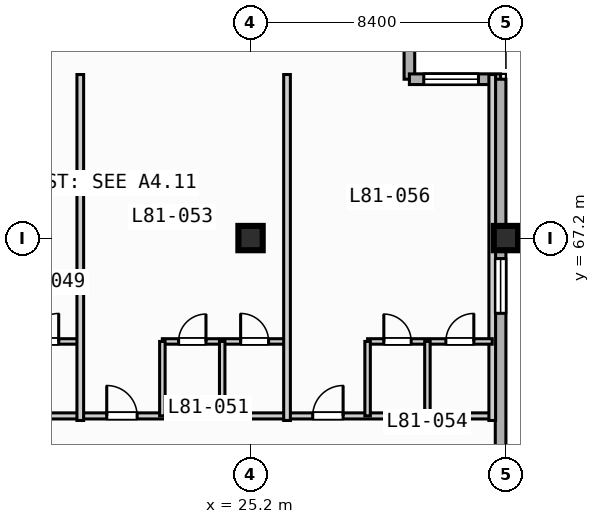
"""IFC4 building model, lengths in metres.
Left out: names, types, materials, properties, quantities, classifications, styles, units other than length and angle.
Written with IfcOpenShell. Run it as: python <this file> out.ifc"""

import sys

from ifc_helpers import new_model, si_unit, direction, frame, frame_2d, origin, origin_2d, place, context, subcontext, project, spatial, rectangle, extrude, element, fill, save


model = new_model("IFC4")
c1 = context("Model", 3, precision=1e-05, world=origin(), true_north=direction((0.0, 1.0)))
c2 = subcontext(c1, "Body", "Model", "MODEL_VIEW")
j1 = project(units=[si_unit("LENGTHUNIT", "METRE"), si_unit("PLANEANGLEUNIT", "RADIAN")], contexts=[c1])
p1 = place(None, origin())
s1 = spatial("IfcSite", under=j1, at=p1, CompositionType="ELEMENT")
p2 = place(p1, origin())
s2 = spatial("IfcBuilding", under=s1, at=p2, CompositionType="ELEMENT")
p3 = place(p2, frame((0.0, 0.0, 328.1)))
s3 = spatial("IfcBuildingStorey", under=s2, at=p3, CompositionType="ELEMENT", Elevation=328.1)
for number, where, z_axis, x_axis in (
    (1, (25.2, 67.2, 0.0), (0.0, 0.0, 1.0), (1.0, 0.0, 0.0)),
    (2, (33.6, 67.2, 0.0), (0.0, 0.0, 1.0), (1.0, 0.0, 0.0)),
):
    element("IfcColumn", number, at=place(p3, frame(where, z_axis=z_axis, x_axis=x_axis)), inside=s3, PredefinedType="COLUMN", context=c2, shape_type="SweptSolid", body=[
        extrude(rectangle(XDim=0.8, YDim=0.8, at=origin_2d()), origin(), (0.0, 0.0, 1.0), 3.9),
    ])
p4 = place(p3, frame((30.425, 75.425, 0.0), z_axis=(0.0, 0.0, 1.0), x_axis=(0.0, -1.0, 0.0)))
e3 = element("IfcWall", 3, at=p4, inside=s3, PredefinedType="STANDARD", context=c2, shape_type="SweptSolid", body=[
    extrude(rectangle(XDim=3.0, YDim=0.35, at=frame_2d((1.5, 0.0))), origin(), (0.0, 0.0, 1.0), 3.67),
])
p5 = place(p3, frame((30.425, 72.425, 0.0), z_axis=(0.0, 0.0, 1.0), x_axis=(1.0, 0.0, 0.0)))
e4 = element("IfcWall", 4, at=p5, inside=s3, PredefinedType="STANDARD", context=c2, shape_type="SweptSolid", body=[
    extrude(rectangle(XDim=3.0, YDim=0.35, at=frame_2d((1.5, 0.0))), origin(), (0.0, 0.0, 1.0), 3.67),
])
p6 = place(p5, frame((0.472, 0.0, 0.85)))
e5 = element("IfcOpeningElement", 5, at=p6, cuts=e4, PredefinedType="OPENING", context=c2, shape_type="SweptSolid", body=[
    extrude(rectangle(XDim=1.8, YDim=1.8, at=frame_2d((0.9, 0.9))), frame((0.0, 0.185, 0.0), z_axis=(0.0, -1.0, 0.0), x_axis=(1.0, 0.0, 0.0)), (0.0, 0.0, 1.0), 0.37),
])
p7 = place(p3, frame((33.425, 72.425, 0.0), z_axis=(0.0, 0.0, 1.0), x_axis=(0.0, -1.0, 0.0)))
e6 = element("IfcWall", 6, at=p7, inside=s3, PredefinedType="STANDARD", context=c2, shape_type="SweptSolid", body=[
    extrude(rectangle(XDim=39.0, YDim=0.35, at=frame_2d((19.5, 0.0))), origin(), (0.0, 0.0, 1.0), 3.67),
])
p8 = place(p7, frame((5.9, 0.0, 0.85)))
e7 = element("IfcOpeningElement", 7, at=p8, cuts=e6, PredefinedType="OPENING", context=c2, shape_type="SweptSolid", body=[
    extrude(rectangle(XDim=1.8, YDim=1.8, at=frame_2d((0.9, 0.9))), frame((0.0, 0.185, 0.0), z_axis=(0.0, -1.0, 0.0), x_axis=(1.0, 0.0, 0.0)), (0.0, 0.0, 1.0), 0.37),
])
p9 = place(p3, frame((11.8, 61.35, 0.0), z_axis=(0.0, 0.0, 1.0), x_axis=(1.0, 0.0, 0.0)))
e8 = element("IfcWall", 8, at=p9, inside=s3, PredefinedType="PARTITIONING", context=c2, shape_type="SweptSolid", body=[
    extrude(rectangle(XDim=21.35, YDim=0.2, at=frame_2d((10.675, 0.0))), origin(), (0.0, 0.0, 1.0), 3.67),
])
p10 = place(p9, frame((1.17, 0.0, 0.0)))
e9 = element("IfcOpeningElement", 9, at=p10, cuts=e8, PredefinedType="OPENING", context=c2, shape_type="SweptSolid", body=[
    extrude(rectangle(XDim=1.0, YDim=2.15, at=frame_2d((0.5, 1.075))), frame((0.0, 0.11, 0.0), z_axis=(0.0, -1.0, 0.0), x_axis=(1.0, 0.0, 0.0)), (0.0, 0.0, 1.0), 0.22),
])
p11 = place(p9, frame((8.67, 0.0, 0.0)))
e10 = element("IfcOpeningElement", 10, at=p11, cuts=e8, PredefinedType="OPENING", context=c2, shape_type="SweptSolid", body=[
    extrude(rectangle(XDim=1.0, YDim=2.15, at=frame_2d((0.5, 1.075))), frame((0.0, 0.11, 0.0), z_axis=(0.0, -1.0, 0.0), x_axis=(1.0, 0.0, 0.0)), (0.0, 0.0, 1.0), 0.22),
])
p12 = place(p9, frame((15.445, 0.0, 0.0)))
e11 = element("IfcOpeningElement", 11, at=p12, cuts=e8, PredefinedType="OPENING", context=c2, shape_type="SweptSolid", body=[
    extrude(rectangle(XDim=1.0, YDim=2.15, at=frame_2d((0.5, 1.075))), frame((0.0, 0.11, 0.0), z_axis=(0.0, -1.0, 0.0), x_axis=(1.0, 0.0, 0.0)), (0.0, 0.0, 1.0), 0.22),
])
p13 = place(p3, frame((15.1, 63.8, 0.0), z_axis=(0.0, 0.0, 1.0), x_axis=(1.0, 0.0, 0.0)))
e12 = element("IfcWall", 12, at=p13, inside=s3, PredefinedType="PLUMBINGWALL", context=c2, shape_type="SweptSolid", body=[
    extrude(rectangle(XDim=4.5, YDim=0.18, at=frame_2d((2.25, 0.0))), origin(), (0.0, 0.0, 1.0), 3.67),
])
p14 = place(p13, frame((0.63, 0.0, 0.0)))
e13 = element("IfcOpeningElement", 13, at=p14, cuts=e12, PredefinedType="OPENING", context=c2, shape_type="SweptSolid", body=[
    extrude(rectangle(XDim=0.9, YDim=2.1, at=frame_2d((0.45, 1.05))), frame((0.0, 0.1, 0.0), z_axis=(0.0, -1.0, 0.0), x_axis=(1.0, 0.0, 0.0)), (0.0, 0.0, 1.0), 0.2),
])
p15 = place(p13, frame((2.87, 0.0, 0.0)))
e14 = element("IfcOpeningElement", 14, at=p15, cuts=e12, PredefinedType="OPENING", context=c2, shape_type="SweptSolid", body=[
    extrude(rectangle(XDim=0.92, YDim=2.1, at=frame_2d((0.46, 1.05))), frame((0.0, 0.1, 0.0), z_axis=(0.0, -1.0, 0.0), x_axis=(1.0, 0.0, 0.0)), (0.0, 0.0, 1.0), 0.2),
])
p16 = place(p3, frame((19.6, 61.2, 0.0), z_axis=(0.0, 0.0, 1.0), x_axis=(0.0, 1.0, 0.0)))
e15 = element("IfcWall", 15, at=p16, inside=s3, PredefinedType="PARTITIONING", context=c2, shape_type="SweptSolid", body=[
    extrude(rectangle(XDim=11.38, YDim=0.22, at=frame_2d((5.69, 0.0))), origin(), (0.0, 0.0, 1.0), 3.67),
])
p17 = place(p3, frame((22.3, 63.8, 0.0), z_axis=(0.0, 0.0, 1.0), x_axis=(1.0, 0.0, 0.0)))
e16 = element("IfcWall", 16, at=p17, inside=s3, PredefinedType="PLUMBINGWALL", context=c2, shape_type="SweptSolid", body=[
    extrude(rectangle(XDim=4.1, YDim=0.18, at=frame_2d((2.05, 0.0))), origin(), (0.0, 0.0, 1.0), 3.67),
])
p18 = place(p17, frame((0.534, 0.0, 0.0)))
e17 = element("IfcOpeningElement", 17, at=p18, cuts=e16, PredefinedType="OPENING", context=c2, shape_type="SweptSolid", body=[
    extrude(rectangle(XDim=0.9, YDim=2.1, at=frame_2d((0.45, 1.05))), frame((0.0, 0.1, 0.0), z_axis=(0.0, -1.0, 0.0), x_axis=(1.0, 0.0, 0.0)), (0.0, 0.0, 1.0), 0.2),
])
p19 = place(p17, frame((2.574, 0.0, 0.0)))
e18 = element("IfcOpeningElement", 18, at=p19, cuts=e16, PredefinedType="OPENING", context=c2, shape_type="SweptSolid", body=[
    extrude(rectangle(XDim=0.92, YDim=2.1, at=frame_2d((0.46, 1.05))), frame((0.0, 0.1, 0.0), z_axis=(0.0, -1.0, 0.0), x_axis=(1.0, 0.0, 0.0)), (0.0, 0.0, 1.0), 0.2),
])
for number, where, z_axis, x_axis in (
    (19, (22.3, 61.35, 0.0), (0.0, 0.0, 1.0), (0.0, 1.0, 0.0)),
    (20, (24.268, 61.35, 0.0), (0.0, 0.0, 1.0), (0.0, 1.0, 0.0)),
):
    element("IfcWall", number, at=place(p3, frame(where, z_axis=z_axis, x_axis=x_axis)), inside=s3, PredefinedType="PLUMBINGWALL", context=c2, shape_type="SweptSolid", body=[
        extrude(rectangle(XDim=2.45, YDim=0.18, at=frame_2d((1.225, 0.0))), origin(), (0.0, 0.0, 1.0), 3.67),
    ])
for number, where, z_axis, x_axis in (
    (21, (26.4, 61.2, 0.0), (0.0, 0.0, 1.0), (0.0, 1.0, 0.0)),
    (22, (33.15, 61.2, 0.0), (0.0, 0.0, 1.0), (0.0, 1.0, 0.0)),
):
    element("IfcWall", number, at=place(p3, frame(where, z_axis=z_axis, x_axis=x_axis)), inside=s3, PredefinedType="PARTITIONING", context=c2, shape_type="SweptSolid", body=[
        extrude(rectangle(XDim=11.38, YDim=0.22, at=frame_2d((5.69, 0.0))), origin(), (0.0, 0.0, 1.0), 3.67),
    ])
p20 = place(p3, frame((29.05, 63.8, 0.0), z_axis=(0.0, 0.0, 1.0), x_axis=(1.0, 0.0, 0.0)))
e23 = element("IfcWall", 23, at=p20, inside=s3, PredefinedType="PLUMBINGWALL", context=c2, shape_type="SweptSolid", body=[
    extrude(rectangle(XDim=4.1, YDim=0.18, at=frame_2d((2.05, 0.0))), origin(), (0.0, 0.0, 1.0), 3.67),
])
p21 = place(p20, frame((0.534, 0.0, 0.0)))
e24 = element("IfcOpeningElement", 24, at=p21, cuts=e23, PredefinedType="OPENING", context=c2, shape_type="SweptSolid", body=[
    extrude(rectangle(XDim=0.9, YDim=2.1, at=frame_2d((0.45, 1.05))), frame((0.0, 0.1, 0.0), z_axis=(0.0, -1.0, 0.0), x_axis=(1.0, 0.0, 0.0)), (0.0, 0.0, 1.0), 0.2),
])
p22 = place(p20, frame((2.574, 0.0, 0.0)))
e25 = element("IfcOpeningElement", 25, at=p22, cuts=e23, PredefinedType="OPENING", context=c2, shape_type="SweptSolid", body=[
    extrude(rectangle(XDim=0.92, YDim=2.1, at=frame_2d((0.46, 1.05))), frame((0.0, 0.1, 0.0), z_axis=(0.0, -1.0, 0.0), x_axis=(1.0, 0.0, 0.0)), (0.0, 0.0, 1.0), 0.2),
])
for number, where, z_axis, x_axis in (
    (26, (29.05, 61.35, 0.0), (0.0, 0.0, 1.0), (0.0, 1.0, 0.0)),
    (27, (31.018, 61.35, 0.0), (0.0, 0.0, 1.0), (0.0, 1.0, 0.0)),
):
    element("IfcWall", number, at=place(p3, frame(where, z_axis=z_axis, x_axis=x_axis)), inside=s3, PredefinedType="PLUMBINGWALL", context=c2, shape_type="SweptSolid", body=[
        extrude(rectangle(XDim=2.45, YDim=0.18, at=frame_2d((1.225, 0.0))), origin(), (0.0, 0.0, 1.0), 3.67),
    ])
p23 = place(p6, origin())
e28 = element("IfcWindow", 28, at=p23, inside=s3, PartitioningType="SINGLE_PANEL", PredefinedType="WINDOW", context=c2, shape_type="SweptSolid", body=[
    extrude(rectangle(XDim=1.8, YDim=1.8, at=frame_2d((0.9, 0.9))), frame((0.0, 0.03, 0.0), z_axis=(0.0, -1.0, 0.0), x_axis=(1.0, 0.0, 0.0)), (0.0, 0.0, 1.0), 0.06),
])
fill(e5, e28)
p24 = place(p8, origin())
e29 = element("IfcWindow", 29, at=p24, inside=s3, PartitioningType="SINGLE_PANEL", PredefinedType="WINDOW", context=c2, shape_type="SweptSolid", body=[
    extrude(rectangle(XDim=1.8, YDim=1.8, at=frame_2d((0.9, 0.9))), frame((0.0, 0.03, 0.0), z_axis=(0.0, -1.0, 0.0), x_axis=(1.0, 0.0, 0.0)), (0.0, 0.0, 1.0), 0.06),
])
fill(e7, e29)
p25 = place(p11, origin())
e30 = element("IfcDoor", 30, at=p25, inside=s3, OperationType="SINGLE_SWING_LEFT", PredefinedType="DOOR", context=c2, shape_type="SweptSolid", body=[
    extrude(rectangle(XDim=1.0, YDim=2.15, at=frame_2d((0.5, 1.075))), frame((0.0, 0.025, 0.0), z_axis=(0.0, -1.0, 0.0), x_axis=(1.0, 0.0, 0.0)), (0.0, 0.0, 1.0), 0.05),
])
fill(e10, e30)
p26 = place(p12, origin())
e31 = element("IfcDoor", 31, at=p26, inside=s3, OperationType="SINGLE_SWING_RIGHT", PredefinedType="DOOR", context=c2, shape_type="SweptSolid", body=[
    extrude(rectangle(XDim=1.0, YDim=2.15, at=frame_2d((0.5, 1.075))), frame((0.0, 0.025, 0.0), z_axis=(0.0, -1.0, 0.0), x_axis=(1.0, 0.0, 0.0)), (0.0, 0.0, 1.0), 0.05),
])
fill(e11, e31)
p27 = place(p15, origin())
e32 = element("IfcDoor", 32, at=p27, inside=s3, OperationType="SINGLE_SWING_RIGHT", PredefinedType="DOOR", context=c2, shape_type="SweptSolid", body=[
    extrude(rectangle(XDim=0.92, YDim=2.1, at=frame_2d((0.46, 1.05))), frame((0.0, 0.025, 0.0), z_axis=(0.0, -1.0, 0.0), x_axis=(1.0, 0.0, 0.0)), (0.0, 0.0, 1.0), 0.05),
])
fill(e14, e32)
p28 = place(p18, origin())
e33 = element("IfcDoor", 33, at=p28, inside=s3, OperationType="SINGLE_SWING_RIGHT", PredefinedType="DOOR", context=c2, shape_type="SweptSolid", body=[
    extrude(rectangle(XDim=0.9, YDim=2.1, at=frame_2d((0.45, 1.05))), frame((0.0, 0.025, 0.0), z_axis=(0.0, -1.0, 0.0), x_axis=(1.0, 0.0, 0.0)), (0.0, 0.0, 1.0), 0.05),
])
fill(e17, e33)
p29 = place(p19, origin())
e34 = element("IfcDoor", 34, at=p29, inside=s3, OperationType="SINGLE_SWING_LEFT", PredefinedType="DOOR", context=c2, shape_type="SweptSolid", body=[
    extrude(rectangle(XDim=0.92, YDim=2.1, at=frame_2d((0.46, 1.05))), frame((0.0, 0.025, 0.0), z_axis=(0.0, -1.0, 0.0), x_axis=(1.0, 0.0, 0.0)), (0.0, 0.0, 1.0), 0.05),
])
fill(e18, e34)
p30 = place(p21, origin())
e35 = element("IfcDoor", 35, at=p30, inside=s3, OperationType="SINGLE_SWING_LEFT", PredefinedType="DOOR", context=c2, shape_type="SweptSolid", body=[
    extrude(rectangle(XDim=0.9, YDim=2.1, at=frame_2d((0.45, 1.05))), frame((0.0, 0.025, 0.0), z_axis=(0.0, -1.0, 0.0), x_axis=(1.0, 0.0, 0.0)), (0.0, 0.0, 1.0), 0.05),
])
fill(e24, e35)
p31 = place(p22, origin())
e36 = element("IfcDoor", 36, at=p31, inside=s3, OperationType="SINGLE_SWING_RIGHT", PredefinedType="DOOR", context=c2, shape_type="SweptSolid", body=[
    extrude(rectangle(XDim=0.92, YDim=2.1, at=frame_2d((0.46, 1.05))), frame((0.0, 0.025, 0.0), z_axis=(0.0, -1.0, 0.0), x_axis=(1.0, 0.0, 0.0)), (0.0, 0.0, 1.0), 0.05),
])
fill(e25, e36)
save(model, sys.argv[1])
